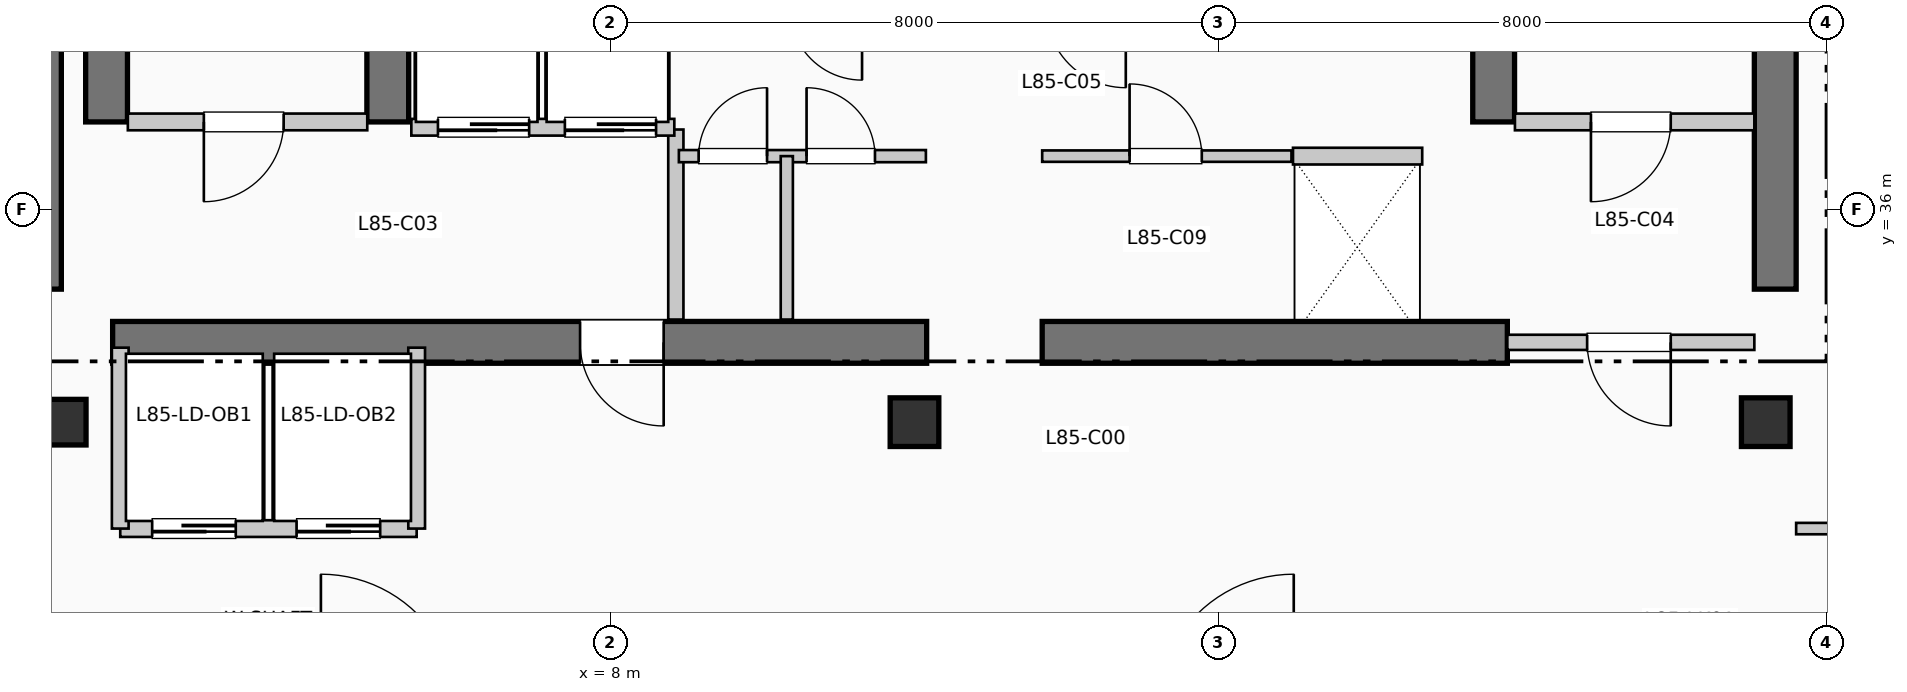
"""IFC4 building model, lengths in metres.
Left out: names, types, materials, properties, quantities, classifications, styles, units other than length and angle.
Written with IfcOpenShell. Run it as: python <this file> out.ifc"""

import sys

from ifc_helpers import new_model, si_unit, direction, frame, frame_2d, origin, origin_2d, place, context, subcontext, project, spatial, rectangle, extrude, element, fill, save


model = new_model("IFC4")
c1 = context("Model", 3, precision=1e-05, world=origin(), true_north=direction((0.0, 1.0)))
c2 = subcontext(c1, "Body", "Model", "MODEL_VIEW")
j1 = project(units=[si_unit("LENGTHUNIT", "METRE"), si_unit("PLANEANGLEUNIT", "RADIAN")], contexts=[c1])
p1 = place(None, origin())
s1 = spatial("IfcSite", under=j1, at=p1, CompositionType="ELEMENT")
p2 = place(p1, origin())
s2 = spatial("IfcBuilding", under=s1, at=p2, CompositionType="ELEMENT")
p3 = place(p2, frame((0.0, 0.0, 347.49)))
s3 = spatial("IfcBuildingStorey", under=s2, at=p3, CompositionType="ELEMENT", Elevation=347.49)
p4 = place(p3, frame((0.5, 34.95, 0.0), z_axis=(0.0, 0.0, 1.0), x_axis=(0.0, 1.0, 0.0)))
e1 = element("IfcWall", 1, at=p4, inside=s3, PredefinedType="SHEAR", context=c2, shape_type="SweptSolid", body=[
    extrude(rectangle(XDim=7.9, YDim=0.55, at=frame_2d((3.95, 0.0))), origin(), (0.0, 0.0, 1.0), 4.62),
])
p5 = place(p3, frame((23.325, 34.95, 0.0), z_axis=(0.0, 0.0, 1.0), x_axis=(0.0, 1.0, 0.0)))
e2 = element("IfcWall", 2, at=p5, inside=s3, PredefinedType="SHEAR", context=c2, shape_type="SweptSolid", body=[
    extrude(rectangle(XDim=10.64, YDim=0.55, at=frame_2d((5.32, 0.0))), origin(), (0.0, 0.0, 1.0), 4.62),
])
p6 = place(p3, frame((1.45, 34.25, 0.0), z_axis=(0.0, 0.0, 1.0), x_axis=(1.0, 0.0, 0.0)))
e3 = element("IfcWall", 3, at=p6, inside=s3, PredefinedType="SHEAR", context=c2, shape_type="SweptSolid", body=[
    extrude(rectangle(XDim=10.71, YDim=0.55, at=frame_2d((5.355, 0.0))), origin(), (0.0, 0.0, 1.0), 4.62),
])
p7 = place(p6, frame((7.25, 0.0, 0.0), z_axis=(0.0, 0.0, 1.0), x_axis=(-1.0, 0.0, 0.0)))
e4 = element("IfcOpeningElement", 4, at=p7, cuts=e3, PredefinedType="OPENING", context=c2, shape_type="SweptSolid", body=[
    extrude(rectangle(XDim=1.1, YDim=2.15, at=frame_2d((0.55, 1.075))), frame((0.0, 0.285, 0.0), z_axis=(0.0, -1.0, 0.0), x_axis=(1.0, 0.0, 0.0)), (0.0, 0.0, 1.0), 0.57),
])
p8 = place(p3, frame((13.68, 34.25, 0.0), z_axis=(0.0, 0.0, 1.0), x_axis=(1.0, 0.0, 0.0)))
e5 = element("IfcWall", 5, at=p8, inside=s3, PredefinedType="SHEAR", context=c2, shape_type="SweptSolid", body=[
    extrude(rectangle(XDim=6.12, YDim=0.55, at=frame_2d((3.06, 0.0))), origin(), (0.0, 0.0, 1.0), 4.62),
])
for number, where, z_axis, x_axis in (
    (6, (1.37, 37.15, 0.0), (0.0, 0.0, 1.0), (0.0, 1.0, 0.0)),
    (7, (5.07, 37.15, 0.0), (0.0, 0.0, 1.0), (0.0, 1.0, 0.0)),
    (8, (19.62, 37.15, 0.0), (0.0, 0.0, 1.0), (0.0, 1.0, 0.0)),
):
    element("IfcWall", number, at=place(p3, frame(where, z_axis=z_axis, x_axis=x_axis)), inside=s3, PredefinedType="SHEAR", context=c2, shape_type="SweptSolid", body=[
        extrude(rectangle(XDim=7.89, YDim=0.55, at=frame_2d((3.945, 0.0))), origin(), (0.0, 0.0, 1.0), 4.62),
    ])
p9 = place(p3, frame((0.8, 33.2, 0.0), z_axis=(0.0, 0.0, 1.0), x_axis=(1.0, 0.0, 0.0)))
e9 = element("IfcColumn", 9, at=p9, inside=s3, PredefinedType="COLUMN", context=c2, shape_type="SweptSolid", body=[
    extrude(rectangle(XDim=0.6, YDim=0.6, at=origin_2d()), origin(), (0.0, 0.0, 1.0), 4.62),
])
for number, where, z_axis, x_axis in (
    (10, (12.0, 33.2, 0.0), (0.0, 0.0, 1.0), (1.0, 0.0, 0.0)),
    (11, (23.2, 33.2, 0.0), (0.0, 0.0, 1.0), (1.0, 0.0, 0.0)),
):
    element("IfcColumn", number, at=place(p3, frame(where, z_axis=z_axis, x_axis=x_axis)), inside=s3, PredefinedType="COLUMN", context=c2, shape_type="SweptSolid", body=[
        extrude(rectangle(XDim=0.64, YDim=0.64, at=origin_2d()), origin(), (0.0, 0.0, 1.0), 4.62),
    ])
p10 = place(p3, frame((1.65, 37.15, 0.0), z_axis=(0.0, 0.0, 1.0), x_axis=(1.0, 0.0, 0.0)))
e12 = element("IfcWall", 12, at=p10, inside=s3, PredefinedType="PARTITIONING", context=c2, shape_type="SweptSolid", body=[
    extrude(rectangle(XDim=3.15, YDim=0.22, at=frame_2d((1.575, 0.0))), origin(), (0.0, 0.0, 1.0), 4.37),
])
p11 = place(p10, frame((2.05, 0.0, 0.0), z_axis=(0.0, 0.0, 1.0), x_axis=(-1.0, 0.0, 0.0)))
e13 = element("IfcOpeningElement", 13, at=p11, cuts=e12, PredefinedType="OPENING", context=c2, shape_type="SweptSolid", body=[
    extrude(rectangle(XDim=1.05, YDim=2.15, at=frame_2d((0.525, 1.075))), frame((0.0, 0.12, 0.0), z_axis=(0.0, -1.0, 0.0), x_axis=(1.0, 0.0, 0.0)), (0.0, 0.0, 1.0), 0.24),
])
p12 = place(p3, frame((8.86, 34.55, 0.0), z_axis=(0.0, 0.0, 1.0), x_axis=(0.0, 1.0, 0.0)))
e14 = element("IfcWall", 14, at=p12, inside=s3, PredefinedType="PARTITIONING", context=c2, shape_type="SweptSolid", body=[
    extrude(rectangle(XDim=2.5, YDim=0.2, at=frame_2d((1.25, 0.0))), origin(), (0.0, 0.0, 1.0), 4.37),
])
p13 = place(p3, frame((19.9, 37.15, 0.0), z_axis=(0.0, 0.0, 1.0), x_axis=(1.0, 0.0, 0.0)))
e15 = element("IfcWall", 15, at=p13, inside=s3, PredefinedType="PARTITIONING", context=c2, shape_type="SweptSolid", body=[
    extrude(rectangle(XDim=3.15, YDim=0.22, at=frame_2d((1.575, 0.0))), origin(), (0.0, 0.0, 1.0), 4.37),
])
p14 = place(p13, frame((2.05, 0.0, 0.0), z_axis=(0.0, 0.0, 1.0), x_axis=(-1.0, 0.0, 0.0)))
e16 = element("IfcOpeningElement", 16, at=p14, cuts=e15, PredefinedType="OPENING", context=c2, shape_type="SweptSolid", body=[
    extrude(rectangle(XDim=1.05, YDim=2.15, at=frame_2d((0.525, 1.075))), frame((0.0, 0.12, 0.0), z_axis=(0.0, -1.0, 0.0), x_axis=(1.0, 0.0, 0.0)), (0.0, 0.0, 1.0), 0.24),
])
p15 = place(p3, frame((19.8, 34.25, 0.0), z_axis=(0.0, 0.0, 1.0), x_axis=(1.0, 0.0, 0.0)))
e17 = element("IfcWall", 17, at=p15, inside=s3, PredefinedType="PARTITIONING", context=c2, shape_type="SweptSolid", body=[
    extrude(rectangle(XDim=3.25, YDim=0.2, at=frame_2d((1.625, 0.0))), origin(), (0.0, 0.0, 1.0), 4.37),
])
p16 = place(p15, frame((2.15, 0.0, 0.0), z_axis=(0.0, 0.0, 1.0), x_axis=(-1.0, 0.0, 0.0)))
e18 = element("IfcOpeningElement", 18, at=p16, cuts=e17, PredefinedType="OPENING", context=c2, shape_type="SweptSolid", body=[
    extrude(rectangle(XDim=1.1, YDim=2.15, at=frame_2d((0.55, 1.075))), frame((0.0, 0.11, 0.0), z_axis=(0.0, -1.0, 0.0), x_axis=(1.0, 0.0, 0.0)), (0.0, 0.0, 1.0), 0.22),
])
p17 = place(p3, frame((5.38, 37.08, 0.0), z_axis=(0.0, 0.0, 1.0), x_axis=(1.0, 0.0, 0.0)))
e19 = element("IfcWall", 19, at=p17, inside=s3, PredefinedType="PARTITIONING", context=c2, shape_type="SweptSolid", body=[
    extrude(rectangle(XDim=3.46, YDim=0.22, at=frame_2d((1.73, 0.0))), origin(), (0.0, 0.0, 1.0), 4.37),
])
p18 = place(p17, frame((1.55, 0.0, 0.0), z_axis=(0.0, 0.0, 1.0), x_axis=(-1.0, 0.0, 0.0)))
e20 = element("IfcOpeningElement", 20, at=p18, cuts=e19, PredefinedType="OPENING", context=c2, shape_type="SweptSolid", body=[
    extrude(rectangle(XDim=1.2, YDim=2.2, at=frame_2d((0.6, 1.1))), frame((0.0, 0.12, 0.0), z_axis=(0.0, -1.0, 0.0), x_axis=(1.0, 0.0, 0.0)), (0.0, 0.0, 1.0), 0.24),
])
p19 = place(p17, frame((3.22, 0.0, 0.0), z_axis=(0.0, 0.0, 1.0), x_axis=(-1.0, 0.0, 0.0)))
e21 = element("IfcOpeningElement", 21, at=p19, cuts=e19, PredefinedType="OPENING", context=c2, shape_type="SweptSolid", body=[
    extrude(rectangle(XDim=1.2, YDim=2.2, at=frame_2d((0.6, 1.1))), frame((0.0, 0.12, 0.0), z_axis=(0.0, -1.0, 0.0), x_axis=(1.0, 0.0, 0.0)), (0.0, 0.0, 1.0), 0.24),
])
p20 = place(p3, frame((1.55, 31.8, 0.0), z_axis=(0.0, 0.0, 1.0), x_axis=(1.0, 0.0, 0.0)))
e22 = element("IfcWall", 22, at=p20, inside=s3, PredefinedType="PARTITIONING", context=c2, shape_type="SweptSolid", body=[
    extrude(rectangle(XDim=3.9, YDim=0.22, at=frame_2d((1.95, 0.0))), origin(), (0.0, 0.0, 1.0), 4.37),
])
p21 = place(p20, frame((1.52, 0.0, 0.0), z_axis=(0.0, 0.0, 1.0), x_axis=(-1.0, 0.0, 0.0)))
e23 = element("IfcOpeningElement", 23, at=p21, cuts=e22, PredefinedType="OPENING", context=c2, shape_type="SweptSolid", body=[
    extrude(rectangle(XDim=1.1, YDim=2.2, at=frame_2d((0.55, 1.1))), frame((0.0, 0.12, 0.0), z_axis=(0.0, -1.0, 0.0), x_axis=(1.0, 0.0, 0.0)), (0.0, 0.0, 1.0), 0.24),
])
p22 = place(p20, frame((3.42, 0.0, 0.0), z_axis=(0.0, 0.0, 1.0), x_axis=(-1.0, 0.0, 0.0)))
e24 = element("IfcOpeningElement", 24, at=p22, cuts=e22, PredefinedType="OPENING", context=c2, shape_type="SweptSolid", body=[
    extrude(rectangle(XDim=1.1, YDim=2.2, at=frame_2d((0.55, 1.1))), frame((0.0, 0.12, 0.0), z_axis=(0.0, -1.0, 0.0), x_axis=(1.0, 0.0, 0.0)), (0.0, 0.0, 1.0), 0.24),
])
for number, where, z_axis, x_axis in (
    (25, (1.55, 31.8, 0.0), (0.0, 0.0, 1.0), (0.0, 1.0, 0.0)),
    (26, (5.45, 31.8, 0.0), (0.0, 0.0, 1.0), (0.0, 1.0, 0.0)),
):
    element("IfcWall", number, at=place(p3, frame(where, z_axis=z_axis, x_axis=x_axis)), inside=s3, PredefinedType="PARTITIONING", context=c2, shape_type="SweptSolid", body=[
        extrude(rectangle(XDim=2.38, YDim=0.22, at=frame_2d((1.19, 0.0))), origin(), (0.0, 0.0, 1.0), 4.37),
    ])
p23 = place(p3, frame((8.9, 36.7, 0.0), z_axis=(0.0, 0.0, 1.0), x_axis=(1.0, 0.0, 0.0)))
e27 = element("IfcWall", 27, at=p23, inside=s3, PredefinedType="PARTITIONING", context=c2, shape_type="SweptSolid", body=[
    extrude(rectangle(XDim=3.25, YDim=0.16, at=frame_2d((1.625, 0.0))), origin(), (0.0, 0.0, 1.0), 4.37),
])
p24 = place(p23, frame((0.26, 0.0, 0.0)))
e28 = element("IfcOpeningElement", 28, at=p24, cuts=e27, PredefinedType="OPENING", context=c2, shape_type="SweptSolid", body=[
    extrude(rectangle(XDim=0.9, YDim=2.15, at=frame_2d((0.45, 1.075))), frame((0.0, 0.09, 0.0), z_axis=(0.0, -1.0, 0.0), x_axis=(1.0, 0.0, 0.0)), (0.0, 0.0, 1.0), 0.18),
])
p25 = place(p23, frame((1.68, 0.0, 0.0)))
e29 = element("IfcOpeningElement", 29, at=p25, cuts=e27, PredefinedType="OPENING", context=c2, shape_type="SweptSolid", body=[
    extrude(rectangle(XDim=0.9, YDim=2.15, at=frame_2d((0.45, 1.075))), frame((0.0, 0.09, 0.0), z_axis=(0.0, -1.0, 0.0), x_axis=(1.0, 0.0, 0.0)), (0.0, 0.0, 1.0), 0.18),
])
p26 = place(p3, frame((10.32, 34.55, 0.0), z_axis=(0.0, 0.0, 1.0), x_axis=(0.0, 1.0, 0.0)))
e30 = element("IfcWall", 30, at=p26, inside=s3, PredefinedType="PARTITIONING", context=c2, shape_type="SweptSolid", body=[
    extrude(rectangle(XDim=2.15, YDim=0.16, at=frame_2d((1.075, 0.0))), origin(), (0.0, 0.0, 1.0), 4.37),
])
p27 = place(p3, frame((13.68, 36.7, 0.0), z_axis=(0.0, 0.0, 1.0), x_axis=(1.0, 0.0, 0.0)))
e31 = element("IfcWall", 31, at=p27, inside=s3, PredefinedType="PARTITIONING", context=c2, shape_type="SweptSolid", body=[
    extrude(rectangle(XDim=3.28, YDim=0.15, at=frame_2d((1.64, 0.0))), origin(), (0.0, 0.0, 1.0), 4.37),
])
p28 = place(p27, frame((1.15, 0.0, 0.0)))
e32 = element("IfcOpeningElement", 32, at=p28, cuts=e31, PredefinedType="OPENING", context=c2, shape_type="SweptSolid", body=[
    extrude(rectangle(XDim=0.95, YDim=2.15, at=frame_2d((0.475, 1.075))), frame((0.0, 0.085, 0.0), z_axis=(0.0, -1.0, 0.0), x_axis=(1.0, 0.0, 0.0)), (0.0, 0.0, 1.0), 0.17),
])
p29 = place(p3, frame((16.98, 36.7, 0.0), z_axis=(0.0, 0.0, 1.0), x_axis=(1.0, 0.0, 0.0)))
e33 = element("IfcWall", 33, at=p29, inside=s3, PredefinedType="PARTITIONING", context=c2, shape_type="SweptSolid", body=[
    extrude(rectangle(XDim=1.7, YDim=0.22, at=frame_2d((0.85, 0.0))), origin(), (0.0, 0.0, 1.0), 4.37),
])
p30 = place(p3, frame((23.6, 31.8, 0.0), z_axis=(0.0, 0.0, 1.0), x_axis=(1.0, 0.0, 0.0)))
e34 = element("IfcWall", 34, at=p30, inside=s3, PredefinedType="PARTITIONING", context=c2, shape_type="SweptSolid", body=[
    extrude(rectangle(XDim=20.61, YDim=0.15, at=frame_2d((10.305, 0.0))), origin(), (0.0, 0.0, 1.0), 4.37),
])
p31 = place(p30, frame((3.0, 0.0, 0.0)))
e35 = element("IfcOpeningElement", 35, at=p31, cuts=e34, PredefinedType="OPENING", context=c2, shape_type="SweptSolid", body=[
    extrude(rectangle(XDim=1.05, YDim=2.15, at=frame_2d((0.525, 1.075))), frame((0.0, 0.085, 0.0), z_axis=(0.0, -1.0, 0.0), x_axis=(1.0, 0.0, 0.0)), (0.0, 0.0, 1.0), 0.17),
])
p32 = place(p30, frame((12.0, 0.0, 0.0)))
e36 = element("IfcOpeningElement", 36, at=p32, cuts=e34, PredefinedType="OPENING", context=c2, shape_type="SweptSolid", body=[
    extrude(rectangle(XDim=0.95, YDim=2.15, at=frame_2d((0.475, 1.075))), frame((0.0, 0.085, 0.0), z_axis=(0.0, -1.0, 0.0), x_axis=(1.0, 0.0, 0.0)), (0.0, 0.0, 1.0), 0.17),
])
p33 = place(p11, origin())
e37 = element("IfcDoor", 37, at=p33, inside=s3, OperationType="SINGLE_SWING_LEFT", PredefinedType="DOOR", context=c2, shape_type="SweptSolid", body=[
    extrude(rectangle(XDim=1.05, YDim=2.15, at=frame_2d((0.525, 1.075))), frame((0.0, 0.025, 0.0), z_axis=(0.0, -1.0, 0.0), x_axis=(1.0, 0.0, 0.0)), (0.0, 0.0, 1.0), 0.05),
])
fill(e13, e37)
p34 = place(p7, origin())
e38 = element("IfcDoor", 38, at=p34, inside=s3, OperationType="SINGLE_SWING_RIGHT", PredefinedType="DOOR", context=c2, shape_type="SweptSolid", body=[
    extrude(rectangle(XDim=1.1, YDim=2.15, at=frame_2d((0.55, 1.075))), frame((0.0, 0.025, 0.0), z_axis=(0.0, -1.0, 0.0), x_axis=(1.0, 0.0, 0.0)), (0.0, 0.0, 1.0), 0.05),
])
fill(e4, e38)
p35 = place(p14, origin())
e39 = element("IfcDoor", 39, at=p35, inside=s3, OperationType="SINGLE_SWING_LEFT", PredefinedType="DOOR", context=c2, shape_type="SweptSolid", body=[
    extrude(rectangle(XDim=1.05, YDim=2.15, at=frame_2d((0.525, 1.075))), frame((0.0, 0.025, 0.0), z_axis=(0.0, -1.0, 0.0), x_axis=(1.0, 0.0, 0.0)), (0.0, 0.0, 1.0), 0.05),
])
fill(e16, e39)
p36 = place(p16, origin())
e40 = element("IfcDoor", 40, at=p36, inside=s3, OperationType="SINGLE_SWING_RIGHT", PredefinedType="DOOR", context=c2, shape_type="SweptSolid", body=[
    extrude(rectangle(XDim=1.1, YDim=2.15, at=frame_2d((0.55, 1.075))), frame((0.0, 0.025, 0.0), z_axis=(0.0, -1.0, 0.0), x_axis=(1.0, 0.0, 0.0)), (0.0, 0.0, 1.0), 0.05),
])
fill(e18, e40)
p37 = place(p18, origin())
e41 = element("IfcDoor", 41, at=p37, inside=s3, OperationType="SLIDING_TO_RIGHT", PredefinedType="DOOR", context=c2, shape_type="SweptSolid", body=[
    extrude(rectangle(XDim=1.2, YDim=2.2, at=frame_2d((0.6, 1.1))), frame((0.0, 0.025, 0.0), z_axis=(0.0, -1.0, 0.0), x_axis=(1.0, 0.0, 0.0)), (0.0, 0.0, 1.0), 0.05),
])
fill(e20, e41)
p38 = place(p19, origin())
e42 = element("IfcDoor", 42, at=p38, inside=s3, OperationType="SLIDING_TO_RIGHT", PredefinedType="DOOR", context=c2, shape_type="SweptSolid", body=[
    extrude(rectangle(XDim=1.2, YDim=2.2, at=frame_2d((0.6, 1.1))), frame((0.0, 0.025, 0.0), z_axis=(0.0, -1.0, 0.0), x_axis=(1.0, 0.0, 0.0)), (0.0, 0.0, 1.0), 0.05),
])
fill(e21, e42)
p39 = place(p21, origin())
e43 = element("IfcDoor", 43, at=p39, inside=s3, OperationType="SLIDING_TO_LEFT", PredefinedType="DOOR", context=c2, shape_type="SweptSolid", body=[
    extrude(rectangle(XDim=1.1, YDim=2.2, at=frame_2d((0.55, 1.1))), frame((0.0, 0.025, 0.0), z_axis=(0.0, -1.0, 0.0), x_axis=(1.0, 0.0, 0.0)), (0.0, 0.0, 1.0), 0.05),
])
fill(e23, e43)
p40 = place(p22, origin())
e44 = element("IfcDoor", 44, at=p40, inside=s3, OperationType="SLIDING_TO_LEFT", PredefinedType="DOOR", context=c2, shape_type="SweptSolid", body=[
    extrude(rectangle(XDim=1.1, YDim=2.2, at=frame_2d((0.55, 1.1))), frame((0.0, 0.025, 0.0), z_axis=(0.0, -1.0, 0.0), x_axis=(1.0, 0.0, 0.0)), (0.0, 0.0, 1.0), 0.05),
])
fill(e24, e44)
p41 = place(p24, origin())
e45 = element("IfcDoor", 45, at=p41, inside=s3, OperationType="SINGLE_SWING_RIGHT", PredefinedType="DOOR", context=c2, shape_type="SweptSolid", body=[
    extrude(rectangle(XDim=0.9, YDim=2.15, at=frame_2d((0.45, 1.075))), frame((0.0, 0.025, 0.0), z_axis=(0.0, -1.0, 0.0), x_axis=(1.0, 0.0, 0.0)), (0.0, 0.0, 1.0), 0.05),
])
fill(e28, e45)
p42 = place(p25, origin())
e46 = element("IfcDoor", 46, at=p42, inside=s3, OperationType="SINGLE_SWING_LEFT", PredefinedType="DOOR", context=c2, shape_type="SweptSolid", body=[
    extrude(rectangle(XDim=0.9, YDim=2.15, at=frame_2d((0.45, 1.075))), frame((0.0, 0.025, 0.0), z_axis=(0.0, -1.0, 0.0), x_axis=(1.0, 0.0, 0.0)), (0.0, 0.0, 1.0), 0.05),
])
fill(e29, e46)
p43 = place(p28, origin())
e47 = element("IfcDoor", 47, at=p43, inside=s3, OperationType="SINGLE_SWING_LEFT", PredefinedType="DOOR", context=c2, shape_type="SweptSolid", body=[
    extrude(rectangle(XDim=0.95, YDim=2.15, at=frame_2d((0.475, 1.075))), frame((0.0, 0.025, 0.0), z_axis=(0.0, -1.0, 0.0), x_axis=(1.0, 0.0, 0.0)), (0.0, 0.0, 1.0), 0.05),
])
fill(e32, e47)
save(model, sys.argv[1])
